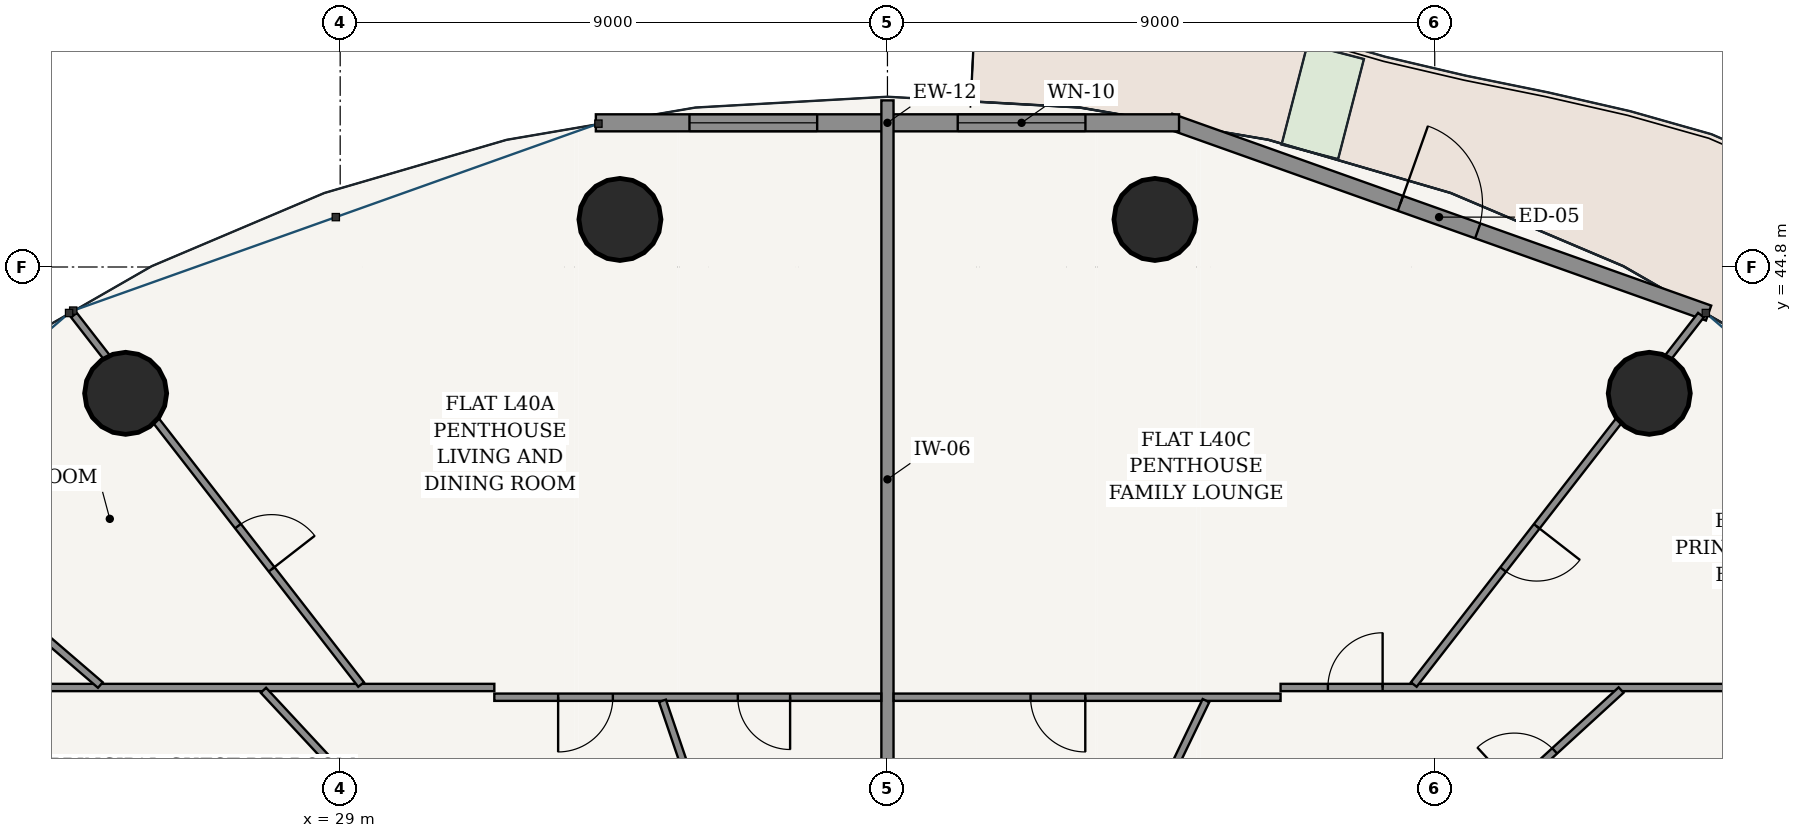
"""IFC4 building model, lengths in metres.
Left out: names, types, materials, properties, quantities, classifications, styles, units other than length and angle.
Written with IfcOpenShell. Run it as: python <this file> out.ifc"""

import sys

from ifc_helpers import new_model, si_unit, direction, frame, frame_2d, origin, origin_2d, place, context, subcontext, project, spatial, rectangle, hollow_circle, extrude, source, transform, mapped, element, fill, save


model = new_model("IFC4")
c1 = context("Model", 3, precision=1e-05, world=origin(), true_north=direction((-0.2419218956, 0.970295726276)))
c2 = subcontext(c1, "Body", "Model", "MODEL_VIEW")
j1 = project(units=[si_unit("LENGTHUNIT", "METRE"), si_unit("PLANEANGLEUNIT", "RADIAN")], contexts=[c1])
p1 = place(None, origin())
s1 = spatial("IfcSite", under=j1, at=p1, CompositionType="ELEMENT")
p2 = place(p1, origin())
s2 = spatial("IfcBuilding", under=s1, at=p2, CompositionType="ELEMENT")
p3 = place(p2, frame((0.0, 0.0, 153.4)))
s3 = spatial("IfcBuildingStorey", under=s2, at=p3, CompositionType="ELEMENT", Elevation=153.4)
for number, where, z_axis, x_axis in (
    (1, (50.528, 42.723, 0.0), (0.0, 0.0, 1.0), (1.0, 0.0, 0.0)),
    (2, (42.399, 45.582, 0.0), (0.0, 0.0, 1.0), (1.0, 0.0, 0.0)),
    (3, (33.601, 45.582, 0.0), (0.0, 0.0, 1.0), (1.0, 0.0, 0.0)),
    (4, (25.472, 42.723, 0.0), (0.0, 0.0, 1.0), (1.0, 0.0, 0.0)),
):
    element("IfcColumn", number, at=place(p3, frame(where, z_axis=z_axis, x_axis=x_axis)), inside=s3, PredefinedType="COLUMN", context=c2, shape_type="SweptSolid", body=[
        extrude(hollow_circle(Radius=0.675, WallThickness=0.042, at=origin_2d()), origin(), (0.0, 0.0, 1.0), 3.6),
    ])
p4 = place(p3, frame((51.503, 44.043, 0.0), z_axis=(0.0, 0.0, 1.0), x_axis=(-0.942095406405, 0.335344964522, 0.0)))
e5 = element("IfcWall", 5, at=p4, inside=s3, PredefinedType="SOLIDWALL", context=c2, shape_type="SweptSolid", body=[
    extrude(rectangle(XDim=9.408, YDim=0.26, at=frame_2d((4.704, 0.0))), origin(), (0.0, 0.0, 1.0), 3.33),
])
p5 = place(p4, frame((4.029, 0.0, 0.0)))
e6 = element("IfcOpeningElement", 6, at=p5, cuts=e5, PredefinedType="OPENING", context=c2, shape_type="SweptSolid", body=[
    extrude(rectangle(XDim=1.35, YDim=2.2, at=frame_2d((0.675, 1.1))), frame((0.0, 0.14, 0.0), z_axis=(0.0, -1.0, 0.0), x_axis=(1.0, 0.0, 0.0)), (0.0, 0.0, 1.0), 0.28),
])
p6 = place(p3, frame((42.795, 47.171, 0.0), z_axis=(0.0, 0.0, 1.0), x_axis=(-1.0, 0.0, 0.0)))
e7 = element("IfcWall", 7, at=p6, inside=s3, PredefinedType="SOLIDWALL", context=c2, shape_type="SweptSolid", body=[
    extrude(rectangle(XDim=9.591, YDim=0.28, at=frame_2d((4.795, 0.0))), origin(), (0.0, 0.0, 1.0), 3.33),
])
p7 = place(p6, frame((1.54, 0.0, 0.85)))
e8 = element("IfcOpeningElement", 8, at=p7, cuts=e7, PredefinedType="OPENING", context=c2, shape_type="SweptSolid", body=[
    extrude(rectangle(XDim=2.1, YDim=1.95, at=frame_2d((1.05, 0.975))), frame((0.0, 0.15, 0.0), z_axis=(0.0, -1.0, 0.0), x_axis=(1.0, 0.0, 0.0)), (0.0, 0.0, 1.0), 0.3),
])
p8 = place(p6, frame((5.951, 0.0, 0.85)))
e9 = element("IfcOpeningElement", 9, at=p8, cuts=e7, PredefinedType="OPENING", context=c2, shape_type="SweptSolid", body=[
    extrude(rectangle(XDim=2.1, YDim=1.95, at=frame_2d((1.05, 0.975))), frame((0.0, 0.15, 0.0), z_axis=(0.0, -1.0, 0.0), x_axis=(1.0, 0.0, 0.0)), (0.0, 0.0, 1.0), 0.3),
])
p9 = place(p3, frame((38.0, 35.075, 0.0), z_axis=(0.0, 0.0, 1.0), x_axis=(0.0, 1.0, 0.0)))
e10 = element("IfcWall", 10, at=p9, inside=s3, PredefinedType="PARTITIONING", context=c2, shape_type="SweptSolid", body=[
    extrude(rectangle(XDim=12.465, YDim=0.2, at=frame_2d((6.232, 0.0))), origin(), (0.0, 0.0, 1.0), 2.415),
])
p10 = place(p3, frame((24.065, 37.885, 0.0), z_axis=(0.0, 0.0, 1.0), x_axis=(1.0, 0.0, 0.0)))
e11 = element("IfcWall", 11, at=p10, inside=s3, PredefinedType="PARTITIONING", context=c2, shape_type="SweptSolid", body=[
    extrude(rectangle(XDim=7.47, YDim=0.12, at=frame_2d((3.735, 0.0))), origin(), (0.0, 0.0, 1.0), 2.776),
])
p11 = place(p3, frame((31.535, 37.725, 0.0), z_axis=(0.0, 0.0, 1.0), x_axis=(1.0, 0.0, 0.0)))
e12 = element("IfcWall", 12, at=p11, inside=s3, PredefinedType="PARTITIONING", context=c2, shape_type="SweptSolid", body=[
    extrude(rectangle(XDim=6.363, YDim=0.12, at=frame_2d((3.182, 0.0))), origin(), (0.0, 0.0, 1.0), 2.776),
])
p12 = place(p11, frame((4.004, 0.0, 0.0)))
e13 = element("IfcOpeningElement", 13, at=p12, cuts=e12, PredefinedType="OPENING", context=c2, shape_type="SweptSolid", body=[
    extrude(rectangle(XDim=0.86, YDim=2.15, at=frame_2d((0.43, 1.075))), frame((0.0, 0.07, 0.0), z_axis=(0.0, -1.0, 0.0), x_axis=(1.0, 0.0, 0.0)), (0.0, 0.0, 1.0), 0.14),
])
p13 = place(p11, frame((1.049, 0.0, 0.0)))
e14 = element("IfcOpeningElement", 14, at=p13, cuts=e12, PredefinedType="OPENING", context=c2, shape_type="SweptSolid", body=[
    extrude(rectangle(XDim=0.9, YDim=2.15, at=frame_2d((0.45, 1.075))), frame((0.0, 0.07, 0.0), z_axis=(0.0, -1.0, 0.0), x_axis=(1.0, 0.0, 0.0)), (0.0, 0.0, 1.0), 0.14),
])
p14 = place(p3, frame((29.344, 37.934, 0.0), z_axis=(0.0, 0.0, 1.0), x_axis=(-0.613758289074, 0.789493991487, 0.0)))
e15 = element("IfcWall", 15, at=p14, inside=s3, PredefinedType="PARTITIONING", context=c2, shape_type="SweptSolid", body=[
    extrude(rectangle(XDim=7.695, YDim=0.12, at=frame_2d((3.848, 0.0))), origin(), (0.0, 0.0, 1.0), 2.776),
])
p15 = place(p14, frame((2.399, 0.0, 0.0)))
e16 = element("IfcOpeningElement", 16, at=p15, cuts=e15, PredefinedType="OPENING", context=c2, shape_type="SweptSolid", body=[
    extrude(rectangle(XDim=0.9, YDim=2.15, at=frame_2d((0.45, 1.075))), frame((0.0, 0.07, 0.0), z_axis=(0.0, -1.0, 0.0), x_axis=(1.0, 0.0, 0.0)), (0.0, 0.0, 1.0), 0.14),
])
p16 = place(p3, frame((25.056, 37.925, 0.0), z_axis=(0.0, 0.0, 1.0), x_axis=(-0.758354915574, 0.65184186888, 0.0)))
e17 = element("IfcWall", 17, at=p16, inside=s3, PredefinedType="PARTITIONING", context=c2, shape_type="SweptSolid", body=[
    extrude(rectangle(XDim=5.432, YDim=0.12, at=frame_2d((2.716, 0.0))), origin(), (0.0, 0.0, 1.0), 2.846),
])
p17 = place(p16, frame((2.266, 0.0, 0.0)))
e18 = element("IfcOpeningElement", 18, at=p17, cuts=e17, PredefinedType="OPENING", context=c2, shape_type="SweptSolid", body=[
    extrude(rectangle(XDim=0.9, YDim=2.15, at=frame_2d((0.45, 1.075))), frame((0.0, 0.07, 0.0), z_axis=(0.0, -1.0, 0.0), x_axis=(1.0, 0.0, 0.0)), (0.0, 0.0, 1.0), 0.14),
])
p18 = place(p3, frame((35.182, 35.075, 0.0), z_axis=(0.0, 0.0, 1.0), x_axis=(-0.322321614946, 0.946630221649, 0.0)))
e19 = element("IfcWall", 19, at=p18, inside=s3, PredefinedType="PARTITIONING", context=c2, shape_type="SweptSolid", body=[
    extrude(rectangle(XDim=2.737, YDim=0.12, at=frame_2d((1.369, 0.0))), origin(), (0.0, 0.0, 1.0), 2.415),
])
p19 = place(p3, frame((30.307, 35.075, 0.0), z_axis=(0.0, 0.0, 1.0), x_axis=(-0.68082810609, 0.732443233267, 0.0)))
e20 = element("IfcWall", 20, at=p19, inside=s3, PredefinedType="PARTITIONING", context=c2, shape_type="SweptSolid", body=[
    extrude(rectangle(XDim=3.775, YDim=0.12, at=frame_2d((1.887, 0.0))), origin(), (0.0, 0.0, 1.0), 2.776),
])
p20 = place(p3, frame((38.102, 37.725, 0.0), z_axis=(0.0, 0.0, 1.0), x_axis=(1.0, 0.0, 0.0)))
e21 = element("IfcWall", 21, at=p20, inside=s3, PredefinedType="PARTITIONING", context=c2, shape_type="SweptSolid", body=[
    extrude(rectangle(XDim=6.363, YDim=0.12, at=frame_2d((3.182, 0.0))), origin(), (0.0, 0.0, 1.0), 2.776),
])
p21 = place(p20, frame((2.251, 0.0, 0.0)))
e22 = element("IfcOpeningElement", 22, at=p21, cuts=e21, PredefinedType="OPENING", context=c2, shape_type="SweptSolid", body=[
    extrude(rectangle(XDim=0.9, YDim=2.15, at=frame_2d((0.45, 1.075))), frame((0.0, 0.07, 0.0), z_axis=(0.0, -1.0, 0.0), x_axis=(1.0, 0.0, 0.0)), (0.0, 0.0, 1.0), 0.14),
])
p22 = place(p3, frame((44.465, 37.885, 0.0), z_axis=(0.0, 0.0, 1.0), x_axis=(1.0, 0.0, 0.0)))
e23 = element("IfcWall", 23, at=p22, inside=s3, PredefinedType="PARTITIONING", context=c2, shape_type="SweptSolid", body=[
    extrude(rectangle(XDim=7.47, YDim=0.12, at=frame_2d((3.735, 0.0))), origin(), (0.0, 0.0, 1.0), 2.776),
])
p23 = place(p22, frame((0.778, 0.0, 0.0)))
e24 = element("IfcOpeningElement", 24, at=p23, cuts=e23, PredefinedType="OPENING", context=c2, shape_type="SweptSolid", body=[
    extrude(rectangle(XDim=0.9, YDim=2.15, at=frame_2d((0.45, 1.075))), frame((0.0, 0.07, 0.0), z_axis=(0.0, -1.0, 0.0), x_axis=(1.0, 0.0, 0.0)), (0.0, 0.0, 1.0), 0.14),
])
p24 = place(p3, frame((46.656, 37.934, 0.0), z_axis=(0.0, 0.0, 1.0), x_axis=(0.613758289074, 0.789493991487, 0.0)))
e25 = element("IfcWall", 25, at=p24, inside=s3, PredefinedType="PARTITIONING", context=c2, shape_type="SweptSolid", body=[
    extrude(rectangle(XDim=7.695, YDim=0.12, at=frame_2d((3.848, 0.0))), origin(), (0.0, 0.0, 1.0), 2.776),
])
p25 = place(p24, frame((2.395, 0.0, 0.0)))
e26 = element("IfcOpeningElement", 26, at=p25, cuts=e25, PredefinedType="OPENING", context=c2, shape_type="SweptSolid", body=[
    extrude(rectangle(XDim=0.9, YDim=2.15, at=frame_2d((0.45, 1.075))), frame((0.0, 0.07, 0.0), z_axis=(0.0, -1.0, 0.0), x_axis=(1.0, 0.0, 0.0)), (0.0, 0.0, 1.0), 0.14),
])
p26 = place(p3, frame((47.216, 35.235, 0.0), z_axis=(0.0, 0.0, 1.0), x_axis=(0.73766811085, 0.675163504816, 0.0)))
e27 = element("IfcWall", 27, at=p26, inside=s3, PredefinedType="PARTITIONING", context=c2, shape_type="SweptSolid", body=[
    extrude(rectangle(XDim=3.863, YDim=0.12, at=frame_2d((1.932, 0.0))), origin(), (0.0, 0.0, 1.0), 2.776),
])
p27 = place(p26, frame((1.481, 0.0, 0.0)))
e28 = element("IfcOpeningElement", 28, at=p27, cuts=e27, PredefinedType="OPENING", context=c2, shape_type="SweptSolid", body=[
    extrude(rectangle(XDim=0.9, YDim=2.15, at=frame_2d((0.45, 1.075))), frame((0.0, 0.07, 0.0), z_axis=(0.0, -1.0, 0.0), x_axis=(1.0, 0.0, 0.0)), (0.0, 0.0, 1.0), 0.14),
])
p28 = place(p3, frame((41.988, 35.075, 0.0), z_axis=(0.0, 0.0, 1.0), x_axis=(0.434144408634, 0.900843289619, 0.0)))
e29 = element("IfcWall", 29, at=p28, inside=s3, PredefinedType="PARTITIONING", context=c2, shape_type="SweptSolid", body=[
    extrude(rectangle(XDim=2.88, YDim=0.12, at=frame_2d((1.44, 0.0))), origin(), (0.0, 0.0, 1.0), 3.33),
])
m1 = source(origin(), c2, "Body", "SweptSolid", [
    extrude(rectangle(XDim=1.35, YDim=2.2, at=frame_2d((0.675, 1.1))), frame((0.0, 0.025, 0.0), z_axis=(0.0, -1.0, 0.0), x_axis=(1.0, 0.0, 0.0)), (0.0, 0.0, 1.0), 0.05),
])
p29 = place(p5, frame((1.35, 0.0, 0.0), z_axis=(0.0, 0.0, 1.0), x_axis=(-1.0, 0.0, 0.0)))
e30 = element("IfcDoor", 30, at=p29, inside=s3, OperationType="SINGLE_SWING_LEFT", PredefinedType="DOOR", context=c2, shape_type="MappedRepresentation", body=[
    mapped(m1, transform((0.0, 0.0, 0.0), scale=1.0)),
])
fill(e6, e30)
m2 = source(origin(), c2, "Body", "SweptSolid", [
    extrude(rectangle(XDim=2.1, YDim=1.95, at=frame_2d((1.05, 0.975))), frame((0.0, 0.03, 0.0), z_axis=(0.0, -1.0, 0.0), x_axis=(1.0, 0.0, 0.0)), (0.0, 0.0, 1.0), 0.06),
])
p30 = place(p7, origin())
e31 = element("IfcWindow", 31, at=p30, inside=s3, PartitioningType="SINGLE_PANEL", PredefinedType="WINDOW", context=c2, shape_type="MappedRepresentation", body=[
    mapped(m2, transform((0.0, 0.0, 0.0), scale=1.0)),
])
fill(e8, e31)
p31 = place(p8, origin())
e32 = element("IfcWindow", 32, at=p31, inside=s3, PartitioningType="SINGLE_PANEL", PredefinedType="WINDOW", context=c2, shape_type="MappedRepresentation", body=[
    mapped(m2, transform((0.0, 0.0, 0.0), scale=1.0)),
])
fill(e9, e32)
m3 = source(origin(), c2, "Body", "SweptSolid", [
    extrude(rectangle(XDim=0.9, YDim=2.15, at=frame_2d((0.45, 1.075))), frame((0.0, 0.025, 0.0), z_axis=(0.0, -1.0, 0.0), x_axis=(1.0, 0.0, 0.0)), (0.0, 0.0, 1.0), 0.05),
])
p32 = place(p15, frame((0.9, 0.0, 0.0), z_axis=(0.0, 0.0, 1.0), x_axis=(-1.0, 0.0, 0.0)))
e33 = element("IfcDoor", 33, at=p32, inside=s3, OperationType="SINGLE_SWING_RIGHT", PredefinedType="DOOR", context=c2, shape_type="MappedRepresentation", body=[
    mapped(m3, transform((0.0, 0.0, 0.0), scale=1.0)),
])
fill(e16, e33)
m4 = source(origin(), c2, "Body", "SweptSolid", [
    extrude(rectangle(XDim=0.86, YDim=2.15, at=frame_2d((0.43, 1.075))), frame((0.0, 0.025, 0.0), z_axis=(0.0, -1.0, 0.0), x_axis=(1.0, 0.0, 0.0)), (0.0, 0.0, 1.0), 0.05),
])
p33 = place(p12, frame((0.86, 0.0, 0.0), z_axis=(0.0, 0.0, 1.0), x_axis=(-1.0, 0.0, 0.0)))
e34 = element("IfcDoor", 34, at=p33, inside=s3, OperationType="SINGLE_SWING_LEFT", PredefinedType="DOOR", context=c2, shape_type="MappedRepresentation", body=[
    mapped(m4, transform((0.0, 0.0, 0.0), scale=1.0)),
])
fill(e13, e34)
p34 = place(p13, frame((0.9, 0.0, 0.0), z_axis=(0.0, 0.0, 1.0), x_axis=(-1.0, 0.0, 0.0)))
e35 = element("IfcDoor", 35, at=p34, inside=s3, OperationType="SINGLE_SWING_RIGHT", PredefinedType="DOOR", context=c2, shape_type="MappedRepresentation", body=[
    mapped(m3, transform((0.0, 0.0, 0.0), scale=1.0)),
])
fill(e14, e35)
p35 = place(p27, origin())
e36 = element("IfcDoor", 36, at=p35, inside=s3, OperationType="SINGLE_SWING_LEFT", PredefinedType="DOOR", context=c2, shape_type="MappedRepresentation", body=[
    mapped(m3, transform((0.0, 0.0, 0.0), scale=1.0)),
])
fill(e28, e36)
p36 = place(p23, origin())
e37 = element("IfcDoor", 37, at=p36, inside=s3, OperationType="SINGLE_SWING_RIGHT", PredefinedType="DOOR", context=c2, shape_type="MappedRepresentation", body=[
    mapped(m3, transform((0.0, 0.0, 0.0), scale=1.0)),
])
fill(e24, e37)
p37 = place(p21, frame((0.9, 0.0, 0.0), z_axis=(0.0, 0.0, 1.0), x_axis=(-1.0, 0.0, 0.0)))
e38 = element("IfcDoor", 38, at=p37, inside=s3, OperationType="SINGLE_SWING_LEFT", PredefinedType="DOOR", context=c2, shape_type="MappedRepresentation", body=[
    mapped(m3, transform((0.0, 0.0, 0.0), scale=1.0)),
])
fill(e22, e38)
p38 = place(p25, frame((0.9, 0.0, 0.0), z_axis=(0.0, 0.0, 1.0), x_axis=(-1.0, 0.0, 0.0)))
e39 = element("IfcDoor", 39, at=p38, inside=s3, OperationType="SINGLE_SWING_LEFT", PredefinedType="DOOR", context=c2, shape_type="MappedRepresentation", body=[
    mapped(m3, transform((0.0, 0.0, 0.0), scale=1.0)),
])
fill(e26, e39)
save(model, sys.argv[1])
